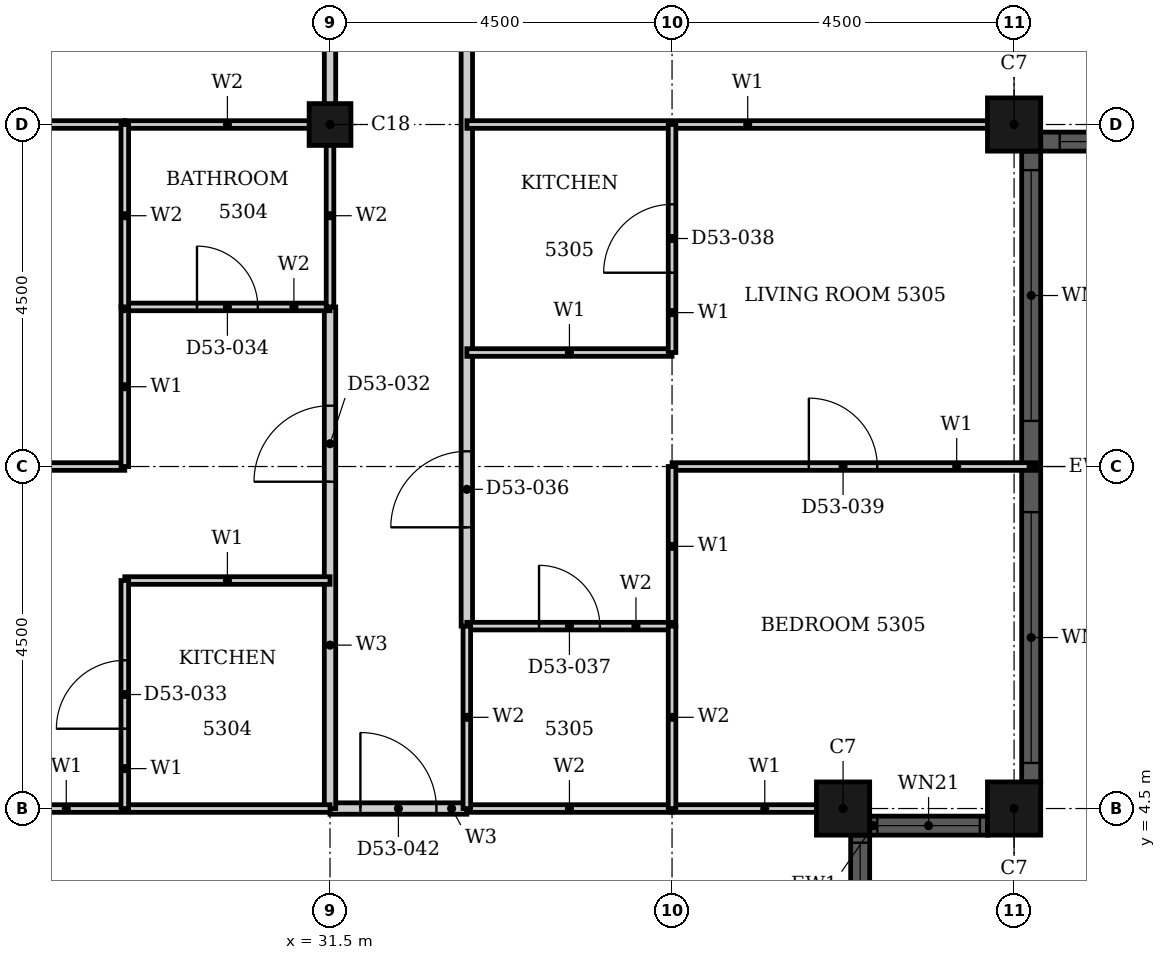
"""IFC4 building model, lengths in metres.
Left out: names, types, materials, properties, quantities, classifications, styles, units other than length and angle.
Written with IfcOpenShell. Run it as: python <this file> out.ifc"""

import sys

from ifc_helpers import new_model, si_unit, direction, frame, frame_2d, origin, origin_2d, place, context, subcontext, project, spatial, rectangle, hollow_rectangle, extrude, element, fill, save


model = new_model("IFC4")
c1 = context("Model", 3, precision=1e-05, world=origin(), true_north=direction((0.0, 1.0)))
c2 = subcontext(c1, "Body", "Model", "MODEL_VIEW")
j1 = project(units=[si_unit("LENGTHUNIT", "METRE"), si_unit("PLANEANGLEUNIT", "RADIAN")], contexts=[c1])
p1 = place(None, origin())
s1 = spatial("IfcSite", under=j1, at=p1, CompositionType="ELEMENT")
p2 = place(p1, origin())
s2 = spatial("IfcBuilding", under=s1, at=p2, CompositionType="ELEMENT")
p3 = place(p2, frame((0.0, 0.0, 210.9)))
s3 = spatial("IfcBuildingStorey", under=s2, at=p3, CompositionType="ELEMENT", Elevation=210.9)
for number, where, z_axis, x_axis in (
    (1, (40.5, 13.5, 0.0), (0.0, 0.0, 1.0), (1.0, 0.0, 0.0)),
    (2, (38.25, 4.5, 0.0), (0.0, 0.0, 1.0), (1.0, 0.0, 0.0)),
    (3, (40.5, 4.5, 0.0), (0.0, 0.0, 1.0), (1.0, 0.0, 0.0)),
):
    element("IfcColumn", number, at=place(p3, frame(where, z_axis=z_axis, x_axis=x_axis)), inside=s3, PredefinedType="COLUMN", context=c2, shape_type="SweptSolid", body=[
        extrude(hollow_rectangle(XDim=0.7, YDim=0.7, WallThickness=0.022, at=origin_2d()), origin(), (0.0, 0.0, 1.0), 3.7),
    ])
p4 = place(p3, frame((31.5, 13.5, 0.0), z_axis=(0.0, 0.0, 1.0), x_axis=(1.0, 0.0, 0.0)))
e4 = element("IfcColumn", 4, at=p4, inside=s3, PredefinedType="COLUMN", context=c2, shape_type="SweptSolid", body=[
    extrude(hollow_rectangle(XDim=0.55, YDim=0.55, WallThickness=0.018, at=origin_2d()), origin(), (0.0, 0.0, 1.0), 3.7),
])
p5 = place(p3, frame((40.85, 13.275, 0.0), z_axis=(0.0, 0.0, 1.0), x_axis=(1.0, 0.0, 0.0)))
e5 = element("IfcWall", 5, at=p5, inside=s3, PredefinedType="SOLIDWALL", context=c2, shape_type="SweptSolid", body=[
    extrude(rectangle(XDim=3.8, YDim=0.25, at=frame_2d((1.9, 0.0))), origin(), (0.0, 0.0, 1.0), 3.7),
])
p6 = place(p5, frame((0.25, 0.0, 0.45)))
e6 = element("IfcOpeningElement", 6, at=p6, cuts=e5, PredefinedType="OPENING", context=c2, shape_type="SweptSolid", body=[
    extrude(rectangle(XDim=3.3, YDim=2.3, at=frame_2d((1.65, 1.15))), frame((0.0, 0.135, 0.0), z_axis=(0.0, -1.0, 0.0), x_axis=(1.0, 0.0, 0.0)), (0.0, 0.0, 1.0), 0.27),
])
p7 = place(p3, frame((38.475, 2.6, 0.0), z_axis=(0.0, 0.0, 1.0), x_axis=(0.0, 1.0, 0.0)))
e7 = element("IfcWall", 7, at=p7, inside=s3, PredefinedType="SOLIDWALL", context=c2, shape_type="SweptSolid", body=[
    extrude(rectangle(XDim=1.55, YDim=0.25, at=frame_2d((0.775, 0.0))), origin(), (0.0, 0.0, 1.0), 3.7),
])
p8 = place(p7, frame((0.1, 0.0, 0.9)))
e8 = element("IfcOpeningElement", 8, at=p8, cuts=e7, PredefinedType="OPENING", context=c2, shape_type="SweptSolid", body=[
    extrude(rectangle(XDim=1.35, YDim=1.85, at=frame_2d((0.675, 0.925))), frame((0.0, 0.135, 0.0), z_axis=(0.0, -1.0, 0.0), x_axis=(1.0, 0.0, 0.0)), (0.0, 0.0, 1.0), 0.27),
])
p9 = place(p3, frame((38.6, 4.275, 0.0), z_axis=(0.0, 0.0, 1.0), x_axis=(1.0, 0.0, 0.0)))
e9 = element("IfcWall", 9, at=p9, inside=s3, PredefinedType="SOLIDWALL", context=c2, shape_type="SweptSolid", body=[
    extrude(rectangle(XDim=1.55, YDim=0.25, at=frame_2d((0.775, 0.0))), origin(), (0.0, 0.0, 1.0), 3.7),
])
p10 = place(p9, frame((0.1, 0.0, 0.9)))
e10 = element("IfcOpeningElement", 10, at=p10, cuts=e9, PredefinedType="OPENING", context=c2, shape_type="SweptSolid", body=[
    extrude(rectangle(XDim=1.35, YDim=1.85, at=frame_2d((0.675, 0.925))), frame((0.0, 0.135, 0.0), z_axis=(0.0, -1.0, 0.0), x_axis=(1.0, 0.0, 0.0)), (0.0, 0.0, 1.0), 0.27),
])
p11 = place(p3, frame((40.725, 4.85, 0.0), z_axis=(0.0, 0.0, 1.0), x_axis=(0.0, 1.0, 0.0)))
e11 = element("IfcWall", 11, at=p11, inside=s3, PredefinedType="SOLIDWALL", context=c2, shape_type="SweptSolid", body=[
    extrude(rectangle(XDim=8.3, YDim=0.25, at=frame_2d((4.15, 0.0))), origin(), (0.0, 0.0, 1.0), 3.7),
])
p12 = place(p11, frame((0.25, 0.0, 0.45)))
e12 = element("IfcOpeningElement", 12, at=p12, cuts=e11, PredefinedType="OPENING", context=c2, shape_type="SweptSolid", body=[
    extrude(rectangle(XDim=3.3, YDim=2.3, at=frame_2d((1.65, 1.15))), frame((0.0, 0.135, 0.0), z_axis=(0.0, -1.0, 0.0), x_axis=(1.0, 0.0, 0.0)), (0.0, 0.0, 1.0), 0.27),
])
p13 = place(p11, frame((4.75, 0.0, 0.45)))
e13 = element("IfcOpeningElement", 13, at=p13, cuts=e11, PredefinedType="OPENING", context=c2, shape_type="SweptSolid", body=[
    extrude(rectangle(XDim=3.3, YDim=2.3, at=frame_2d((1.65, 1.15))), frame((0.0, 0.135, 0.0), z_axis=(0.0, -1.0, 0.0), x_axis=(1.0, 0.0, 0.0)), (0.0, 0.0, 1.0), 0.27),
])
p14 = place(p3, frame((31.5, 4.5, 0.0), z_axis=(0.0, 0.0, 1.0), x_axis=(1.0, 0.0, 0.0)))
e14 = element("IfcWall", 14, at=p14, inside=s3, PredefinedType="PARTITIONING", context=c2, shape_type="SweptSolid", body=[
    extrude(rectangle(XDim=1.8, YDim=0.15, at=frame_2d((0.9, 0.0))), origin(), (0.0, 0.0, 1.0), 3.4),
])
p15 = place(p14, frame((0.4, 0.0, 0.0)))
e15 = element("IfcOpeningElement", 15, at=p15, cuts=e14, PredefinedType="OPENING", context=c2, shape_type="SweptSolid", body=[
    extrude(rectangle(XDim=1.0, YDim=2.1, at=frame_2d((0.5, 1.05))), frame((0.0, 0.085, 0.0), z_axis=(0.0, -1.0, 0.0), x_axis=(1.0, 0.0, 0.0)), (0.0, 0.0, 1.0), 0.17),
])
p16 = place(p3, frame((31.5, 4.5, 0.0), z_axis=(0.0, 0.0, 1.0), x_axis=(0.0, 1.0, 0.0)))
e16 = element("IfcWall", 16, at=p16, inside=s3, PredefinedType="PARTITIONING", context=c2, shape_type="SweptSolid", body=[
    extrude(rectangle(XDim=6.6, YDim=0.15, at=frame_2d((3.3, 0.0))), origin(), (0.0, 0.0, 1.0), 2.68),
])
p17 = place(p16, frame((4.3, 0.0, 0.0)))
e17 = element("IfcOpeningElement", 17, at=p17, cuts=e16, PredefinedType="OPENING", context=c2, shape_type="SweptSolid", body=[
    extrude(rectangle(XDim=1.0, YDim=2.2, at=frame_2d((0.5, 1.1))), frame((0.0, 0.085, 0.0), z_axis=(0.0, -1.0, 0.0), x_axis=(1.0, 0.0, 0.0)), (0.0, 0.0, 1.0), 0.17),
])
p18 = place(p3, frame((31.5, 13.5, 0.0), z_axis=(0.0, 0.0, 1.0), x_axis=(0.0, 1.0, 0.0)))
e18 = element("IfcWall", 18, at=p18, inside=s3, PredefinedType="PARTITIONING", context=c2, shape_type="SweptSolid", body=[
    extrude(rectangle(XDim=7.2, YDim=0.15, at=frame_2d((3.6, 0.0))), origin(), (0.0, 0.0, 1.0), 3.4),
])
p19 = place(p3, frame((33.3, 6.9, 0.0), z_axis=(0.0, 0.0, 1.0), x_axis=(0.0, 1.0, 0.0)))
e19 = element("IfcWall", 19, at=p19, inside=s3, PredefinedType="PARTITIONING", context=c2, shape_type="SweptSolid", body=[
    extrude(rectangle(XDim=13.799, YDim=0.15, at=frame_2d((6.899, 0.0))), origin(), (0.0, 0.0, 1.0), 3.4),
])
p20 = place(p19, frame((1.3, 0.0, 0.0)))
e20 = element("IfcOpeningElement", 20, at=p20, cuts=e19, PredefinedType="OPENING", context=c2, shape_type="SweptSolid", body=[
    extrude(rectangle(XDim=1.0, YDim=2.2, at=frame_2d((0.5, 1.1))), frame((0.0, 0.085, 0.0), z_axis=(0.0, -1.0, 0.0), x_axis=(1.0, 0.0, 0.0)), (0.0, 0.0, 1.0), 0.17),
])
p21 = place(p3, frame((33.3, 10.5, 0.0), z_axis=(0.0, 0.0, 1.0), x_axis=(1.0, 0.0, 0.0)))
e21 = element("IfcWall", 21, at=p21, inside=s3, PredefinedType="PARTITIONING", context=c2, shape_type="SweptSolid", body=[
    extrude(rectangle(XDim=2.7, YDim=0.1, at=frame_2d((1.35, 0.0))), origin(), (0.0, 0.0, 1.0), 3.4),
])
p22 = place(p3, frame((33.301, 13.5, 0.0), z_axis=(0.0, 0.0, 1.0), x_axis=(1.0, 0.0, 0.0)))
e22 = element("IfcWall", 22, at=p22, inside=s3, PredefinedType="PARTITIONING", context=c2, shape_type="SweptSolid", body=[
    extrude(rectangle(XDim=7.389, YDim=0.1, at=frame_2d((3.694, 0.0))), origin(), (0.0, 0.0, 1.0), 2.48),
])
p23 = place(p3, frame((22.31, 13.5, 0.0), z_axis=(0.0, 0.0, 1.0), x_axis=(1.0, 0.0, 0.0)))
e23 = element("IfcWall", 23, at=p23, inside=s3, PredefinedType="PARTITIONING", context=c2, shape_type="SweptSolid", body=[
    extrude(rectangle(XDim=6.49, YDim=0.1, at=frame_2d((3.245, 0.0))), origin(), (0.0, 0.0, 1.0), 2.48),
])
p24 = place(p3, frame((36.0, 4.5, 0.0), z_axis=(0.0, 0.0, 1.0), x_axis=(1.0, 0.0, 0.0)))
e24 = element("IfcWall", 24, at=p24, inside=s3, PredefinedType="PARTITIONING", context=c2, shape_type="SweptSolid", body=[
    extrude(rectangle(XDim=2.44, YDim=0.1, at=frame_2d((1.22, 0.0))), origin(), (0.0, 0.0, 1.0), 3.4),
])
p25 = place(p3, frame((24.56, 4.5, 0.0), z_axis=(0.0, 0.0, 1.0), x_axis=(1.0, 0.0, 0.0)))
e25 = element("IfcWall", 25, at=p25, inside=s3, PredefinedType="PARTITIONING", context=c2, shape_type="SweptSolid", body=[
    extrude(rectangle(XDim=6.94, YDim=0.1, at=frame_2d((3.47, 0.0))), origin(), (0.0, 0.0, 1.0), 3.4),
])
p26 = place(p3, frame((28.8, 7.5, 0.0), z_axis=(0.0, 0.0, 1.0), x_axis=(1.0, 0.0, 0.0)))
e26 = element("IfcWall", 26, at=p26, inside=s3, PredefinedType="PARTITIONING", context=c2, shape_type="SweptSolid", body=[
    extrude(rectangle(XDim=2.7, YDim=0.1, at=frame_2d((1.35, 0.0))), origin(), (0.0, 0.0, 1.0), 3.4),
])
p27 = place(p3, frame((36.0, 9.0, 0.0), z_axis=(0.0, 0.0, 1.0), x_axis=(1.0, 0.0, 0.0)))
e27 = element("IfcWall", 27, at=p27, inside=s3, PredefinedType="PARTITIONING", context=c2, shape_type="SweptSolid", body=[
    extrude(rectangle(XDim=4.79, YDim=0.1, at=frame_2d((2.395, 0.0))), origin(), (0.0, 0.0, 1.0), 3.4),
])
p28 = place(p27, frame((1.8, 0.0, 0.0)))
e28 = element("IfcOpeningElement", 28, at=p28, cuts=e27, PredefinedType="OPENING", context=c2, shape_type="SweptSolid", body=[
    extrude(rectangle(XDim=0.9, YDim=2.1, at=frame_2d((0.45, 1.05))), frame((0.0, 0.06, 0.0), z_axis=(0.0, -1.0, 0.0), x_axis=(1.0, 0.0, 0.0)), (0.0, 0.0, 1.0), 0.12),
])
p29 = place(p3, frame((22.21, 9.0, 0.0), z_axis=(0.0, 0.0, 1.0), x_axis=(1.0, 0.0, 0.0)))
e29 = element("IfcWall", 29, at=p29, inside=s3, PredefinedType="PARTITIONING", context=c2, shape_type="SweptSolid", body=[
    extrude(rectangle(XDim=6.59, YDim=0.1, at=frame_2d((3.295, 0.0))), origin(), (0.0, 0.0, 1.0), 3.4),
])
p30 = place(p29, frame((2.7, 0.0, 0.0)))
e30 = element("IfcOpeningElement", 30, at=p30, cuts=e29, PredefinedType="OPENING", context=c2, shape_type="SweptSolid", body=[
    extrude(rectangle(XDim=0.9, YDim=2.1, at=frame_2d((0.45, 1.05))), frame((0.0, 0.06, 0.0), z_axis=(0.0, -1.0, 0.0), x_axis=(1.0, 0.0, 0.0)), (0.0, 0.0, 1.0), 0.12),
])
p31 = place(p3, frame((28.8, 9.0, 0.0), z_axis=(0.0, 0.0, 1.0), x_axis=(0.0, 1.0, 0.0)))
e31 = element("IfcWall", 31, at=p31, inside=s3, PredefinedType="PARTITIONING", context=c2, shape_type="SweptSolid", body=[
    extrude(rectangle(XDim=2.1, YDim=0.1, at=frame_2d((1.05, 0.0))), origin(), (0.0, 0.0, 1.0), 3.4),
])
p32 = place(p3, frame((28.8, 4.5, 0.0), z_axis=(0.0, 0.0, 1.0), x_axis=(0.0, 1.0, 0.0)))
e32 = element("IfcWall", 32, at=p32, inside=s3, PredefinedType="PARTITIONING", context=c2, shape_type="SweptSolid", body=[
    extrude(rectangle(XDim=3.0, YDim=0.1, at=frame_2d((1.5, 0.0))), origin(), (0.0, 0.0, 1.0), 3.4),
])
p33 = place(p32, frame((1.05, 0.0, 0.0)))
e33 = element("IfcOpeningElement", 33, at=p33, cuts=e32, PredefinedType="OPENING", context=c2, shape_type="SweptSolid", body=[
    extrude(rectangle(XDim=0.9, YDim=2.1, at=frame_2d((0.45, 1.05))), frame((0.0, 0.06, 0.0), z_axis=(0.0, -1.0, 0.0), x_axis=(1.0, 0.0, 0.0)), (0.0, 0.0, 1.0), 0.12),
])
p34 = place(p3, frame((36.0, 6.9, 0.0), z_axis=(0.0, 0.0, 1.0), x_axis=(0.0, 1.0, 0.0)))
e34 = element("IfcWall", 34, at=p34, inside=s3, PredefinedType="PARTITIONING", context=c2, shape_type="SweptSolid", body=[
    extrude(rectangle(XDim=2.1, YDim=0.1, at=frame_2d((1.05, 0.0))), origin(), (0.0, 0.0, 1.0), 2.68),
])
p35 = place(p3, frame((36.0, 10.5, 0.0), z_axis=(0.0, 0.0, 1.0), x_axis=(0.0, 1.0, 0.0)))
e35 = element("IfcWall", 35, at=p35, inside=s3, PredefinedType="PARTITIONING", context=c2, shape_type="SweptSolid", body=[
    extrude(rectangle(XDim=3.0, YDim=0.1, at=frame_2d((1.5, 0.0))), origin(), (0.0, 0.0, 1.0), 2.68),
])
p36 = place(p35, frame((1.05, 0.0, 0.0)))
e36 = element("IfcOpeningElement", 36, at=p36, cuts=e35, PredefinedType="OPENING", context=c2, shape_type="SweptSolid", body=[
    extrude(rectangle(XDim=0.9, YDim=2.1, at=frame_2d((0.45, 1.05))), frame((0.0, 0.06, 0.0), z_axis=(0.0, -1.0, 0.0), x_axis=(1.0, 0.0, 0.0)), (0.0, 0.0, 1.0), 0.12),
])
p37 = place(p3, frame((28.8, 11.1, 0.0), z_axis=(0.0, 0.0, 1.0), x_axis=(1.0, 0.0, 0.0)))
e37 = element("IfcWall", 37, at=p37, inside=s3, PredefinedType="PARTITIONING", context=c2, shape_type="SweptSolid", body=[
    extrude(rectangle(XDim=2.7, YDim=0.1, at=frame_2d((1.35, 0.0))), origin(), (0.0, 0.0, 1.0), 3.4),
])
p38 = place(p37, frame((0.95, 0.0, 0.0)))
e38 = element("IfcOpeningElement", 38, at=p38, cuts=e37, PredefinedType="OPENING", context=c2, shape_type="SweptSolid", body=[
    extrude(rectangle(XDim=0.8, YDim=2.1, at=frame_2d((0.4, 1.05))), frame((0.0, 0.06, 0.0), z_axis=(0.0, -1.0, 0.0), x_axis=(1.0, 0.0, 0.0)), (0.0, 0.0, 1.0), 0.12),
])
p39 = place(p3, frame((28.8, 13.5, 0.0), z_axis=(0.0, 0.0, 1.0), x_axis=(1.0, 0.0, 0.0)))
e39 = element("IfcWall", 39, at=p39, inside=s3, PredefinedType="PARTITIONING", context=c2, shape_type="SweptSolid", body=[
    extrude(rectangle(XDim=2.7, YDim=0.1, at=frame_2d((1.35, 0.0))), origin(), (0.0, 0.0, 1.0), 2.48),
])
p40 = place(p3, frame((33.3, 4.5, 0.0), z_axis=(0.0, 0.0, 1.0), x_axis=(1.0, 0.0, 0.0)))
e40 = element("IfcWall", 40, at=p40, inside=s3, PredefinedType="PARTITIONING", context=c2, shape_type="SweptSolid", body=[
    extrude(rectangle(XDim=2.7, YDim=0.1, at=frame_2d((1.35, 0.0))), origin(), (0.0, 0.0, 1.0), 3.4),
])
p41 = place(p3, frame((33.3, 6.9, 0.0), z_axis=(0.0, 0.0, 1.0), x_axis=(1.0, 0.0, 0.0)))
e41 = element("IfcWall", 41, at=p41, inside=s3, PredefinedType="PARTITIONING", context=c2, shape_type="SweptSolid", body=[
    extrude(rectangle(XDim=2.7, YDim=0.1, at=frame_2d((1.35, 0.0))), origin(), (0.0, 0.0, 1.0), 3.4),
])
p42 = place(p41, frame((0.95, 0.0, 0.0)))
e42 = element("IfcOpeningElement", 42, at=p42, cuts=e41, PredefinedType="OPENING", context=c2, shape_type="SweptSolid", body=[
    extrude(rectangle(XDim=0.8, YDim=2.1, at=frame_2d((0.4, 1.05))), frame((0.0, 0.06, 0.0), z_axis=(0.0, -1.0, 0.0), x_axis=(1.0, 0.0, 0.0)), (0.0, 0.0, 1.0), 0.12),
])
p43 = place(p3, frame((28.8, 11.1, 0.0), z_axis=(0.0, 0.0, 1.0), x_axis=(0.0, 1.0, 0.0)))
e43 = element("IfcWall", 43, at=p43, inside=s3, PredefinedType="PARTITIONING", context=c2, shape_type="SweptSolid", body=[
    extrude(rectangle(XDim=2.4, YDim=0.1, at=frame_2d((1.2, 0.0))), origin(), (0.0, 0.0, 1.0), 3.4),
])
p44 = place(p3, frame((31.5, 11.1, 0.0), z_axis=(0.0, 0.0, 1.0), x_axis=(0.0, 1.0, 0.0)))
e44 = element("IfcWall", 44, at=p44, inside=s3, PredefinedType="PARTITIONING", context=c2, shape_type="SweptSolid", body=[
    extrude(rectangle(XDim=2.4, YDim=0.1, at=frame_2d((1.2, 0.0))), origin(), (0.0, 0.0, 1.0), 2.68),
])
p45 = place(p3, frame((33.3, 4.5, 0.0), z_axis=(0.0, 0.0, 1.0), x_axis=(0.0, 1.0, 0.0)))
e45 = element("IfcWall", 45, at=p45, inside=s3, PredefinedType="PARTITIONING", context=c2, shape_type="SweptSolid", body=[
    extrude(rectangle(XDim=2.4, YDim=0.1, at=frame_2d((1.2, 0.0))), origin(), (0.0, 0.0, 1.0), 3.4),
])
p46 = place(p3, frame((36.0, 4.5, 0.0), z_axis=(0.0, 0.0, 1.0), x_axis=(0.0, 1.0, 0.0)))
e46 = element("IfcWall", 46, at=p46, inside=s3, PredefinedType="PARTITIONING", context=c2, shape_type="SweptSolid", body=[
    extrude(rectangle(XDim=2.4, YDim=0.1, at=frame_2d((1.2, 0.0))), origin(), (0.0, 0.0, 1.0), 2.68),
])
p47 = place(p6, origin())
e47 = element("IfcWindow", 47, at=p47, inside=s3, PartitioningType="SINGLE_PANEL", PredefinedType="WINDOW", context=c2, shape_type="SweptSolid", body=[
    extrude(rectangle(XDim=3.3, YDim=2.3, at=frame_2d((1.65, 1.15))), frame((0.0, 0.03, 0.0), z_axis=(0.0, -1.0, 0.0), x_axis=(1.0, 0.0, 0.0)), (0.0, 0.0, 1.0), 0.06),
])
fill(e6, e47)
p48 = place(p8, origin())
e48 = element("IfcWindow", 48, at=p48, inside=s3, PartitioningType="SINGLE_PANEL", PredefinedType="WINDOW", context=c2, shape_type="SweptSolid", body=[
    extrude(rectangle(XDim=1.35, YDim=1.85, at=frame_2d((0.675, 0.925))), frame((0.0, 0.03, 0.0), z_axis=(0.0, -1.0, 0.0), x_axis=(1.0, 0.0, 0.0)), (0.0, 0.0, 1.0), 0.06),
])
fill(e8, e48)
p49 = place(p10, origin())
e49 = element("IfcWindow", 49, at=p49, inside=s3, PartitioningType="SINGLE_PANEL", PredefinedType="WINDOW", context=c2, shape_type="SweptSolid", body=[
    extrude(rectangle(XDim=1.35, YDim=1.85, at=frame_2d((0.675, 0.925))), frame((0.0, 0.03, 0.0), z_axis=(0.0, -1.0, 0.0), x_axis=(1.0, 0.0, 0.0)), (0.0, 0.0, 1.0), 0.06),
])
fill(e10, e49)
p50 = place(p12, origin())
e50 = element("IfcWindow", 50, at=p50, inside=s3, PartitioningType="SINGLE_PANEL", PredefinedType="WINDOW", context=c2, shape_type="SweptSolid", body=[
    extrude(rectangle(XDim=3.3, YDim=2.3, at=frame_2d((1.65, 1.15))), frame((0.0, 0.03, 0.0), z_axis=(0.0, -1.0, 0.0), x_axis=(1.0, 0.0, 0.0)), (0.0, 0.0, 1.0), 0.06),
])
fill(e12, e50)
p51 = place(p13, origin())
e51 = element("IfcWindow", 51, at=p51, inside=s3, PartitioningType="SINGLE_PANEL", PredefinedType="WINDOW", context=c2, shape_type="SweptSolid", body=[
    extrude(rectangle(XDim=3.3, YDim=2.3, at=frame_2d((1.65, 1.15))), frame((0.0, 0.03, 0.0), z_axis=(0.0, -1.0, 0.0), x_axis=(1.0, 0.0, 0.0)), (0.0, 0.0, 1.0), 0.06),
])
fill(e13, e51)
p52 = place(p17, origin())
e52 = element("IfcDoor", 52, at=p52, inside=s3, OperationType="SINGLE_SWING_LEFT", PredefinedType="DOOR", context=c2, shape_type="SweptSolid", body=[
    extrude(rectangle(XDim=1.0, YDim=2.2, at=frame_2d((0.5, 1.1))), frame((0.0, 0.025, 0.0), z_axis=(0.0, -1.0, 0.0), x_axis=(1.0, 0.0, 0.0)), (0.0, 0.0, 1.0), 0.05),
])
fill(e17, e52)
p53 = place(p33, origin())
e53 = element("IfcDoor", 53, at=p53, inside=s3, OperationType="SINGLE_SWING_RIGHT", PredefinedType="DOOR", context=c2, shape_type="SweptSolid", body=[
    extrude(rectangle(XDim=0.9, YDim=2.1, at=frame_2d((0.45, 1.05))), frame((0.0, 0.025, 0.0), z_axis=(0.0, -1.0, 0.0), x_axis=(1.0, 0.0, 0.0)), (0.0, 0.0, 1.0), 0.05),
])
fill(e33, e53)
p54 = place(p38, origin())
e54 = element("IfcDoor", 54, at=p54, inside=s3, OperationType="SINGLE_SWING_LEFT", PredefinedType="DOOR", context=c2, shape_type="SweptSolid", body=[
    extrude(rectangle(XDim=0.8, YDim=2.1, at=frame_2d((0.4, 1.05))), frame((0.0, 0.025, 0.0), z_axis=(0.0, -1.0, 0.0), x_axis=(1.0, 0.0, 0.0)), (0.0, 0.0, 1.0), 0.05),
])
fill(e38, e54)
p55 = place(p20, origin())
e55 = element("IfcDoor", 55, at=p55, inside=s3, OperationType="SINGLE_SWING_RIGHT", PredefinedType="DOOR", context=c2, shape_type="SweptSolid", body=[
    extrude(rectangle(XDim=1.0, YDim=2.2, at=frame_2d((0.5, 1.1))), frame((0.0, 0.025, 0.0), z_axis=(0.0, -1.0, 0.0), x_axis=(1.0, 0.0, 0.0)), (0.0, 0.0, 1.0), 0.05),
])
fill(e20, e55)
p56 = place(p42, origin())
e56 = element("IfcDoor", 56, at=p56, inside=s3, OperationType="SINGLE_SWING_RIGHT", PredefinedType="DOOR", context=c2, shape_type="SweptSolid", body=[
    extrude(rectangle(XDim=0.8, YDim=2.1, at=frame_2d((0.4, 1.05))), frame((0.0, 0.025, 0.0), z_axis=(0.0, -1.0, 0.0), x_axis=(1.0, 0.0, 0.0)), (0.0, 0.0, 1.0), 0.05),
])
fill(e42, e56)
p57 = place(p36, origin())
e57 = element("IfcDoor", 57, at=p57, inside=s3, OperationType="SINGLE_SWING_LEFT", PredefinedType="DOOR", context=c2, shape_type="SweptSolid", body=[
    extrude(rectangle(XDim=0.9, YDim=2.1, at=frame_2d((0.45, 1.05))), frame((0.0, 0.025, 0.0), z_axis=(0.0, -1.0, 0.0), x_axis=(1.0, 0.0, 0.0)), (0.0, 0.0, 1.0), 0.05),
])
fill(e36, e57)
p58 = place(p28, origin())
e58 = element("IfcDoor", 58, at=p58, inside=s3, OperationType="SINGLE_SWING_RIGHT", PredefinedType="DOOR", context=c2, shape_type="SweptSolid", body=[
    extrude(rectangle(XDim=0.9, YDim=2.1, at=frame_2d((0.45, 1.05))), frame((0.0, 0.025, 0.0), z_axis=(0.0, -1.0, 0.0), x_axis=(1.0, 0.0, 0.0)), (0.0, 0.0, 1.0), 0.05),
])
fill(e28, e58)
p59 = place(p15, origin())
e59 = element("IfcDoor", 59, at=p59, inside=s3, OperationType="SINGLE_SWING_LEFT", PredefinedType="DOOR", context=c2, shape_type="SweptSolid", body=[
    extrude(rectangle(XDim=1.0, YDim=2.1, at=frame_2d((0.5, 1.05))), frame((0.0, 0.025, 0.0), z_axis=(0.0, -1.0, 0.0), x_axis=(1.0, 0.0, 0.0)), (0.0, 0.0, 1.0), 0.05),
])
fill(e15, e59)
save(model, sys.argv[1])
